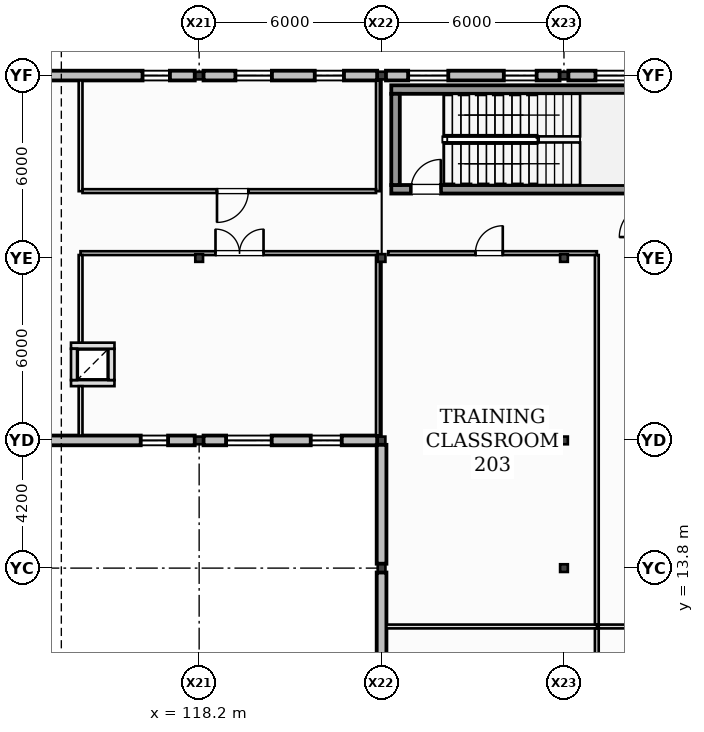
"""IFC4 building model, lengths in metres.
Left out: names, types, materials, properties, quantities, classifications, styles, units other than length and angle.
Written with IfcOpenShell. Run it as: python <this file> out.ifc"""

import sys

from ifc_helpers import new_model, si_unit, direction, frame, frame_2d, origin, origin_2d, place, context, subcontext, project, spatial, rectangle, hollow_rectangle, i_section, extrude, element, fill, save


model = new_model("IFC4")
c1 = context("Model", 3, precision=1e-05, world=origin(), true_north=direction((0.0, 1.0)))
c2 = subcontext(c1, "Body", "Model", "MODEL_VIEW")
j1 = project(units=[si_unit("LENGTHUNIT", "METRE"), si_unit("PLANEANGLEUNIT", "RADIAN")], contexts=[c1])
p1 = place(None, origin())
s1 = spatial("IfcSite", under=j1, at=p1, CompositionType="ELEMENT")
p2 = place(p1, origin())
s2 = spatial("IfcBuilding", under=s1, at=p2, CompositionType="ELEMENT")
p3 = place(p2, frame((0.0, 0.0, 6.0)))
s3 = spatial("IfcBuildingStorey", under=s2, at=p3, CompositionType="ELEMENT", Elevation=6.0)
for number, where, z_axis, x_axis in (
    (1, (118.2, 18.0, 0.0), (0.0, 0.0, 1.0), (1.0, 0.0, 0.0)),
    (2, (118.2, 24.0, 0.0), (0.0, 0.0, 1.0), (1.0, 0.0, 0.0)),
):
    element("IfcColumn", number, at=place(p3, frame(where, z_axis=z_axis, x_axis=x_axis)), inside=s3, PredefinedType="COLUMN", context=c2, shape_type="SweptSolid", body=[
        extrude(i_section(OverallWidth=0.254, OverallDepth=0.253, WebThickness=0.009, FlangeThickness=0.014, at=origin_2d()), origin(), (0.0, 0.0, 1.0), 4.0),
    ])
p4 = place(p3, frame((118.2, 30.0, 0.0), z_axis=(0.0, 0.0, 1.0), x_axis=(1.0, 0.0, 0.0)))
e3 = element("IfcColumn", 3, at=p4, inside=s3, PredefinedType="COLUMN", context=c2, shape_type="SweptSolid", body=[
    extrude(hollow_rectangle(XDim=0.25, YDim=0.25, WallThickness=0.012, at=origin_2d()), origin(), (0.0, 0.0, 1.0), 4.0),
])
p5 = place(p3, frame((124.2, 13.8, 0.0), z_axis=(0.0, 0.0, 1.0), x_axis=(1.0, 0.0, 0.0)))
e4 = element("IfcColumn", 4, at=p5, inside=s3, PredefinedType="COLUMN", context=c2, shape_type="SweptSolid", body=[
    extrude(i_section(OverallWidth=0.254, OverallDepth=0.253, WebThickness=0.009, FlangeThickness=0.014, at=origin_2d()), origin(), (0.0, 0.0, 1.0), 4.0),
])
p6 = place(p3, frame((124.2, 18.0, 0.0), z_axis=(0.0, 0.0, 1.0), x_axis=(1.0, 0.0, 0.0)))
e5 = element("IfcColumn", 5, at=p6, inside=s3, PredefinedType="COLUMN", context=c2, shape_type="SweptSolid", body=[
    extrude(hollow_rectangle(XDim=0.25, YDim=0.25, WallThickness=0.012, at=origin_2d()), origin(), (0.0, 0.0, 1.0), 4.0),
])
for number, where, z_axis, x_axis in (
    (6, (124.2, 24.0, 0.0), (0.0, 0.0, 1.0), (1.0, 0.0, 0.0)),
    (7, (124.2, 30.0, 0.0), (0.0, 0.0, 1.0), (1.0, 0.0, 0.0)),
    (8, (130.2, 13.8, 0.0), (0.0, 0.0, 1.0), (1.0, 0.0, 0.0)),
    (9, (130.2, 18.0, 0.0), (0.0, 0.0, 1.0), (1.0, 0.0, 0.0)),
    (10, (130.2, 24.0, 0.0), (0.0, 0.0, 1.0), (1.0, 0.0, 0.0)),
):
    element("IfcColumn", number, at=place(p3, frame(where, z_axis=z_axis, x_axis=x_axis)), inside=s3, PredefinedType="COLUMN", context=c2, shape_type="SweptSolid", body=[
        extrude(i_section(OverallWidth=0.254, OverallDepth=0.253, WebThickness=0.009, FlangeThickness=0.014, at=origin_2d()), origin(), (0.0, 0.0, 1.0), 4.0),
    ])
p7 = place(p3, frame((130.2, 30.0, 0.0), z_axis=(0.0, 0.0, 1.0), x_axis=(1.0, 0.0, 0.0)))
e11 = element("IfcColumn", 11, at=p7, inside=s3, PredefinedType="COLUMN", context=c2, shape_type="SweptSolid", body=[
    extrude(hollow_rectangle(XDim=0.25, YDim=0.25, WallThickness=0.012, at=origin_2d()), origin(), (0.0, 0.0, 1.0), 4.0),
])
p8 = place(p3, frame((112.345, 18.0, 0.0), z_axis=(0.0, 0.0, 1.0), x_axis=(1.0, 0.0, 0.0)))
e12 = element("IfcWall", 12, at=p8, inside=s3, PredefinedType="STANDARD", context=c2, shape_type="SweptSolid", body=[
    extrude(rectangle(XDim=5.71, YDim=0.32, at=frame_2d((2.855, 0.0))), origin(), (0.0, 0.0, 1.0), 3.619),
])
p9 = place(p8, frame((3.933, 0.0, 0.86)))
e13 = element("IfcOpeningElement", 13, at=p9, cuts=e12, PredefinedType="OPENING", context=c2, shape_type="SweptSolid", body=[
    extrude(rectangle(XDim=0.9, YDim=0.9, at=frame_2d((0.45, 0.45))), frame((0.0, 0.17, 0.0), z_axis=(0.0, -1.0, 0.0), x_axis=(1.0, 0.0, 0.0)), (0.0, 0.0, 1.0), 0.34),
])
p10 = place(p3, frame((118.345, 18.0, 0.0), z_axis=(0.0, 0.0, 1.0), x_axis=(1.0, 0.0, 0.0)))
e14 = element("IfcWall", 14, at=p10, inside=s3, PredefinedType="STANDARD", context=c2, shape_type="SweptSolid", body=[
    extrude(rectangle(XDim=5.71, YDim=0.32, at=frame_2d((2.855, 0.0))), origin(), (0.0, 0.0, 1.0), 3.619),
])
p11 = place(p10, frame((0.741, 0.0, 1.28)))
e15 = element("IfcOpeningElement", 15, at=p11, cuts=e14, PredefinedType="OPENING", context=c2, shape_type="SweptSolid", body=[
    extrude(rectangle(XDim=1.5, YDim=1.5, at=frame_2d((0.75, 0.75))), frame((0.0, 0.17, 0.0), z_axis=(0.0, -1.0, 0.0), x_axis=(1.0, 0.0, 0.0)), (0.0, 0.0, 1.0), 0.34),
])
p12 = place(p10, frame((3.525, 0.0, 1.18)))
e16 = element("IfcOpeningElement", 16, at=p12, cuts=e14, PredefinedType="OPENING", context=c2, shape_type="SweptSolid", body=[
    extrude(rectangle(XDim=1.02, YDim=1.02, at=frame_2d((0.51, 0.51))), frame((0.0, 0.17, 0.0), z_axis=(0.0, -1.0, 0.0), x_axis=(1.0, 0.0, 0.0)), (0.0, 0.0, 1.0), 0.34),
])
p13 = place(p3, frame((118.055, 30.0, 0.0), z_axis=(0.0, 0.0, 1.0), x_axis=(-1.0, 0.0, 0.0)))
e17 = element("IfcWall", 17, at=p13, inside=s3, PredefinedType="STANDARD", context=c2, shape_type="SweptSolid", body=[
    extrude(rectangle(XDim=5.71, YDim=0.32, at=frame_2d((2.855, 0.0))), origin(), (0.0, 0.0, 1.0), 3.619),
])
p14 = place(p13, frame((0.817, 0.0, 0.86)))
e18 = element("IfcOpeningElement", 18, at=p14, cuts=e17, PredefinedType="OPENING", context=c2, shape_type="SweptSolid", body=[
    extrude(rectangle(XDim=0.9, YDim=0.9, at=frame_2d((0.45, 0.45))), frame((0.0, 0.17, 0.0), z_axis=(0.0, -1.0, 0.0), x_axis=(1.0, 0.0, 0.0)), (0.0, 0.0, 1.0), 0.34),
])
p15 = place(p3, frame((124.055, 30.0, 0.0), z_axis=(0.0, 0.0, 1.0), x_axis=(-1.0, 0.0, 0.0)))
e19 = element("IfcWall", 19, at=p15, inside=s3, PredefinedType="STANDARD", context=c2, shape_type="SweptSolid", body=[
    extrude(rectangle(XDim=5.71, YDim=0.32, at=frame_2d((2.855, 0.0))), origin(), (0.0, 0.0, 1.0), 3.619),
])
p16 = place(p15, frame((1.092, 0.0, 1.18)))
e20 = element("IfcOpeningElement", 20, at=p16, cuts=e19, PredefinedType="OPENING", context=c2, shape_type="SweptSolid", body=[
    extrude(rectangle(XDim=0.96, YDim=0.96, at=frame_2d((0.48, 0.48))), frame((0.0, 0.17, 0.0), z_axis=(0.0, -1.0, 0.0), x_axis=(1.0, 0.0, 0.0)), (0.0, 0.0, 1.0), 0.34),
])
p17 = place(p15, frame((3.462, 0.0, 0.96)))
e21 = element("IfcOpeningElement", 21, at=p17, cuts=e19, PredefinedType="OPENING", context=c2, shape_type="SweptSolid", body=[
    extrude(rectangle(XDim=1.2, YDim=1.2, at=frame_2d((0.6, 0.6))), frame((0.0, 0.17, 0.0), z_axis=(0.0, -1.0, 0.0), x_axis=(1.0, 0.0, 0.0)), (0.0, 0.0, 1.0), 0.34),
])
p18 = place(p3, frame((130.055, 30.0, 0.0), z_axis=(0.0, 0.0, 1.0), x_axis=(-1.0, 0.0, 0.0)))
e22 = element("IfcWall", 22, at=p18, inside=s3, PredefinedType="STANDARD", context=c2, shape_type="SweptSolid", body=[
    extrude(rectangle(XDim=5.71, YDim=0.32, at=frame_2d((2.855, 0.0))), origin(), (0.0, 0.0, 1.0), 3.153),
])
p19 = place(p18, frame((0.754, 0.0, 1.42)))
e23 = element("IfcOpeningElement", 23, at=p19, cuts=e22, PredefinedType="OPENING", context=c2, shape_type="SweptSolid", body=[
    extrude(rectangle(XDim=1.08, YDim=1.08, at=frame_2d((0.54, 0.54))), frame((0.0, 0.17, 0.0), z_axis=(0.0, -1.0, 0.0), x_axis=(1.0, 0.0, 0.0)), (0.0, 0.0, 1.0), 0.34),
])
p20 = place(p18, frame((3.66, 0.0, 1.28)))
e24 = element("IfcOpeningElement", 24, at=p20, cuts=e22, PredefinedType="OPENING", context=c2, shape_type="SweptSolid", body=[
    extrude(rectangle(XDim=1.32, YDim=1.32, at=frame_2d((0.66, 0.66))), frame((0.0, 0.17, 0.0), z_axis=(0.0, -1.0, 0.0), x_axis=(1.0, 0.0, 0.0)), (0.0, 0.0, 1.0), 0.34),
])
p21 = place(p3, frame((136.055, 30.0, 0.0), z_axis=(0.0, 0.0, 1.0), x_axis=(-1.0, 0.0, 0.0)))
e25 = element("IfcWall", 25, at=p21, inside=s3, PredefinedType="STANDARD", context=c2, shape_type="SweptSolid", body=[
    extrude(rectangle(XDim=5.71, YDim=0.32, at=frame_2d((2.855, 0.0))), origin(), (0.0, 0.0, 1.0), 3.153),
])
p22 = place(p21, frame((0.936, 0.0, 0.96)))
e26 = element("IfcOpeningElement", 26, at=p22, cuts=e25, PredefinedType="OPENING", context=c2, shape_type="SweptSolid", body=[
    extrude(rectangle(XDim=1.2, YDim=1.2, at=frame_2d((0.6, 0.6))), frame((0.0, 0.17, 0.0), z_axis=(0.0, -1.0, 0.0), x_axis=(1.0, 0.0, 0.0)), (0.0, 0.0, 1.0), 0.34),
])
p23 = place(p21, frame((3.378, 0.0, 0.86)))
e27 = element("IfcOpeningElement", 27, at=p23, cuts=e25, PredefinedType="OPENING", context=c2, shape_type="SweptSolid", body=[
    extrude(rectangle(XDim=1.44, YDim=1.44, at=frame_2d((0.72, 0.72))), frame((0.0, 0.17, 0.0), z_axis=(0.0, -1.0, 0.0), x_axis=(1.0, 0.0, 0.0)), (0.0, 0.0, 1.0), 0.34),
])
p24 = place(p3, frame((124.2, 13.655, 0.0), z_axis=(0.0, 0.0, 1.0), x_axis=(0.0, -1.0, 0.0)))
e28 = element("IfcWall", 28, at=p24, inside=s3, PredefinedType="STANDARD", context=c2, shape_type="SweptSolid", body=[
    extrude(rectangle(XDim=5.71, YDim=0.32, at=frame_2d((2.855, 0.0))), origin(), (0.0, 0.0, 1.0), 3.227),
])
p25 = place(p24, frame((3.933, 0.0, 1.28)))
e29 = element("IfcOpeningElement", 29, at=p25, cuts=e28, PredefinedType="OPENING", context=c2, shape_type="SweptSolid", body=[
    extrude(rectangle(XDim=0.9, YDim=0.9, at=frame_2d((0.45, 0.45))), frame((0.0, 0.17, 0.0), z_axis=(0.0, -1.0, 0.0), x_axis=(1.0, 0.0, 0.0)), (0.0, 0.0, 1.0), 0.34),
])
p26 = place(p3, frame((124.2, 17.855, 0.0), z_axis=(0.0, 0.0, 1.0), x_axis=(0.0, -1.0, 0.0)))
e30 = element("IfcWall", 30, at=p26, inside=s3, PredefinedType="STANDARD", context=c2, shape_type="SweptSolid", body=[
    extrude(rectangle(XDim=3.91, YDim=0.32, at=frame_2d((1.955, 0.0))), origin(), (0.0, 0.0, 1.0), 3.227),
])
p27 = place(p3, frame((124.52, 26.26, 0.0), z_axis=(0.0, 0.0, 1.0), x_axis=(1.0, 0.0, 0.0)))
e31 = element("IfcWall", 31, at=p27, inside=s3, PredefinedType="SHEAR", context=c2, shape_type="SweptSolid", body=[
    extrude(rectangle(XDim=8.16, YDim=0.28, at=frame_2d((4.08, 0.0))), origin(), (0.0, 0.0, 1.0), 4.0),
])
p28 = place(p27, frame((0.65, 0.0, 0.0)))
e32 = element("IfcOpeningElement", 32, at=p28, cuts=e31, PredefinedType="OPENING", context=c2, shape_type="SweptSolid", body=[
    extrude(rectangle(XDim=0.98, YDim=2.15, at=frame_2d((0.49, 1.075))), frame((0.0, 0.15, 0.0), z_axis=(0.0, -1.0, 0.0), x_axis=(1.0, 0.0, 0.0)), (0.0, 0.0, 1.0), 0.3),
])
p29 = place(p3, frame((132.68, 29.54, 0.0), z_axis=(0.0, 0.0, 1.0), x_axis=(-1.0, 0.0, 0.0)))
e33 = element("IfcWall", 33, at=p29, inside=s3, PredefinedType="SHEAR", context=c2, shape_type="SweptSolid", body=[
    extrude(rectangle(XDim=8.16, YDim=0.28, at=frame_2d((4.08, 0.0))), origin(), (0.0, 0.0, 1.0), 4.0),
])
p30 = place(p3, frame((124.66, 29.4, 0.0), z_axis=(0.0, 0.0, 1.0), x_axis=(0.0, -1.0, 0.0)))
e34 = element("IfcWall", 34, at=p30, inside=s3, PredefinedType="SHEAR", context=c2, shape_type="SweptSolid", body=[
    extrude(rectangle(XDim=3.0, YDim=0.28, at=frame_2d((1.5, 0.0))), origin(), (0.0, 0.0, 1.0), 4.0),
])
p31 = place(p3, frame((113.985, 19.885, 0.0), z_axis=(0.0, 0.0, 1.0), x_axis=(1.0, 0.0, 0.0)))
e35 = element("IfcWall", 35, at=p31, inside=s3, PredefinedType="PARTITIONING", context=c2, shape_type="SweptSolid", body=[
    extrude(rectangle(XDim=1.43, YDim=0.2, at=frame_2d((0.715, 0.0))), origin(), (0.0, 0.0, 1.0), 3.72),
])
p32 = place(p3, frame((115.315, 19.985, 0.0), z_axis=(0.0, 0.0, 1.0), x_axis=(0.0, 1.0, 0.0)))
e36 = element("IfcWall", 36, at=p32, inside=s3, PredefinedType="PARTITIONING", context=c2, shape_type="SweptSolid", body=[
    extrude(rectangle(XDim=1.03, YDim=0.2, at=frame_2d((0.515, 0.0))), origin(), (0.0, 0.0, 1.0), 3.72),
])
p33 = place(p3, frame((115.415, 21.115, 0.0), z_axis=(0.0, 0.0, 1.0), x_axis=(-1.0, 0.0, 0.0)))
e37 = element("IfcWall", 37, at=p33, inside=s3, PredefinedType="PARTITIONING", context=c2, shape_type="SweptSolid", body=[
    extrude(rectangle(XDim=1.43, YDim=0.2, at=frame_2d((0.715, 0.0))), origin(), (0.0, 0.0, 1.0), 3.72),
])
p34 = place(p3, frame((114.085, 21.015, 0.0), z_axis=(0.0, 0.0, 1.0), x_axis=(0.0, -1.0, 0.0)))
e38 = element("IfcWall", 38, at=p34, inside=s3, PredefinedType="PARTITIONING", context=c2, shape_type="SweptSolid", body=[
    extrude(rectangle(XDim=1.03, YDim=0.2, at=frame_2d((0.515, 0.0))), origin(), (0.0, 0.0, 1.0), 3.72),
])
p35 = place(p3, frame((114.298, 24.16, 0.0), z_axis=(0.0, 0.0, 1.0), x_axis=(1.0, 0.0, 0.0)))
e39 = element("IfcWall", 39, at=p35, inside=s3, PredefinedType="PARTITIONING", context=c2, shape_type="SweptSolid", body=[
    extrude(rectangle(XDim=9.785, YDim=0.125, at=frame_2d((4.893, 0.0))), origin(), (0.0, 0.0, 1.0), 3.72),
])
p36 = place(p35, frame((4.44, 0.0, 0.0)))
e40 = element("IfcOpeningElement", 40, at=p36, cuts=e39, PredefinedType="OPENING", context=c2, shape_type="SweptSolid", body=[
    extrude(rectangle(XDim=1.58, YDim=2.2, at=frame_2d((0.79, 1.1))), frame((0.0, 0.073, 0.0), z_axis=(0.0, -1.0, 0.0), x_axis=(1.0, 0.0, 0.0)), (0.0, 0.0, 1.0), 0.145),
])
p37 = place(p3, frame((124.08, 24.097, 0.0), z_axis=(0.0, 0.0, 1.0), x_axis=(0.0, -1.0, 0.0)))
e41 = element("IfcWall", 41, at=p37, inside=s3, PredefinedType="PARTITIONING", context=c2, shape_type="SweptSolid", body=[
    extrude(rectangle(XDim=5.938, YDim=0.125, at=frame_2d((2.969, 0.0))), origin(), (0.0, 0.0, 1.0), 3.72),
])
p38 = place(p3, frame((114.3, 18.16, 0.0), z_axis=(0.0, 0.0, 1.0), x_axis=(0.0, 1.0, 0.0)))
e42 = element("IfcWall", 42, at=p38, inside=s3, PredefinedType="PARTITIONING", context=c2, shape_type="SweptSolid", body=[
    extrude(rectangle(XDim=1.625, YDim=0.125, at=frame_2d((0.812, 0.0))), origin(), (0.0, 0.0, 1.0), 3.72),
])
p39 = place(p3, frame((114.3, 21.215, 0.0), z_axis=(0.0, 0.0, 1.0), x_axis=(0.0, 1.0, 0.0)))
e43 = element("IfcWall", 43, at=p39, inside=s3, PredefinedType="PARTITIONING", context=c2, shape_type="SweptSolid", body=[
    extrude(rectangle(XDim=2.882, YDim=0.125, at=frame_2d((1.441, 0.0))), origin(), (0.0, 0.0, 1.0), 3.72),
])
for number, where, z_axis, x_axis in (
    (44, (114.3, 26.198, 0.0), (0.0, 0.0, 1.0), (0.0, 1.0, 0.0)),
    (45, (124.08, 29.84, 0.0), (0.0, 0.0, 1.0), (0.0, -1.0, 0.0)),
):
    element("IfcWall", number, at=place(p3, frame(where, z_axis=z_axis, x_axis=x_axis)), inside=s3, PredefinedType="PARTITIONING", context=c2, shape_type="SweptSolid", body=[
        extrude(rectangle(XDim=3.643, YDim=0.125, at=frame_2d((1.821, 0.0))), origin(), (0.0, 0.0, 1.0), 3.72),
    ])
p40 = place(p3, frame((124.018, 26.2, 0.0), z_axis=(0.0, 0.0, 1.0), x_axis=(-1.0, 0.0, 0.0)))
e46 = element("IfcWall", 46, at=p40, inside=s3, PredefinedType="PARTITIONING", context=c2, shape_type="SweptSolid", body=[
    extrude(rectangle(XDim=9.655, YDim=0.125, at=frame_2d((4.828, 0.0))), origin(), (0.0, 0.0, 1.0), 3.72),
])
p41 = place(p40, frame((4.2, 0.0, 0.0)))
e47 = element("IfcOpeningElement", 47, at=p41, cuts=e46, PredefinedType="OPENING", context=c2, shape_type="SweptSolid", body=[
    extrude(rectangle(XDim=1.03, YDim=2.15, at=frame_2d((0.515, 1.075))), frame((0.0, 0.073, 0.0), z_axis=(0.0, -1.0, 0.0), x_axis=(1.0, 0.0, 0.0)), (0.0, 0.0, 1.0), 0.145),
])
p42 = place(p3, frame((124.36, 11.88, 0.0), z_axis=(0.0, 0.0, 1.0), x_axis=(1.0, 0.0, 0.0)))
e48 = element("IfcWall", 48, at=p42, inside=s3, PredefinedType="PARTITIONING", context=c2, shape_type="SweptSolid", body=[
    extrude(rectangle(XDim=6.922, YDim=0.125, at=frame_2d((3.461, 0.0))), origin(), (0.0, 0.0, 1.0), 3.72),
])
p43 = place(p3, frame((131.28, 11.817, 0.0), z_axis=(0.0, 0.0, 1.0), x_axis=(0.0, -1.0, 0.0)))
e49 = element("IfcWall", 49, at=p43, inside=s3, PredefinedType="PARTITIONING", context=c2, shape_type="SweptSolid", body=[
    extrude(rectangle(XDim=9.857, YDim=0.125, at=frame_2d((4.929, 0.0))), origin(), (0.0, 0.0, 1.0), 3.72),
])
p44 = place(p43, frame((4.574, 0.0, 0.0)))
e50 = element("IfcOpeningElement", 50, at=p44, cuts=e49, PredefinedType="OPENING", context=c2, shape_type="SweptSolid", body=[
    extrude(rectangle(XDim=0.93, YDim=2.1, at=frame_2d((0.465, 1.05))), frame((0.0, 0.073, 0.0), z_axis=(0.0, -1.0, 0.0), x_axis=(1.0, 0.0, 0.0)), (0.0, 0.0, 1.0), 0.145),
])
p45 = place(p3, frame((131.343, 11.88, 0.0), z_axis=(0.0, 0.0, 1.0), x_axis=(1.0, 0.0, 0.0)))
e51 = element("IfcWall", 51, at=p45, inside=s3, PredefinedType="PARTITIONING", context=c2, shape_type="SweptSolid", body=[
    extrude(rectangle(XDim=6.82, YDim=0.125, at=frame_2d((3.41, 0.0))), origin(), (0.0, 0.0, 1.0), 3.72),
])
p46 = place(p3, frame((124.417, 24.16, 0.0), z_axis=(0.0, 0.0, 1.0), x_axis=(1.0, 0.0, 0.0)))
e52 = element("IfcWall", 52, at=p46, inside=s3, PredefinedType="PARTITIONING", context=c2, shape_type="SweptSolid", body=[
    extrude(rectangle(XDim=6.865, YDim=0.125, at=frame_2d((3.433, 0.0))), origin(), (0.0, 0.0, 1.0), 3.153),
])
p47 = place(p46, frame((2.87, 0.0, 0.0)))
e53 = element("IfcOpeningElement", 53, at=p47, cuts=e52, PredefinedType="OPENING", context=c2, shape_type="SweptSolid", body=[
    extrude(rectangle(XDim=0.9, YDim=2.1, at=frame_2d((0.45, 1.05))), frame((0.0, 0.073, 0.0), z_axis=(0.0, -1.0, 0.0), x_axis=(1.0, 0.0, 0.0)), (0.0, 0.0, 1.0), 0.145),
])
p48 = place(p3, frame((131.28, 24.097, 0.0), z_axis=(0.0, 0.0, 1.0), x_axis=(0.0, -1.0, 0.0)))
e54 = element("IfcWall", 54, at=p48, inside=s3, PredefinedType="PARTITIONING", context=c2, shape_type="SweptSolid", body=[
    extrude(rectangle(XDim=12.155, YDim=0.125, at=frame_2d((6.078, 0.0))), origin(), (0.0, 0.0, 1.0), 3.72),
])
p49 = place(p9, origin())
e55 = element("IfcWindow", 55, at=p49, inside=s3, PartitioningType="SINGLE_PANEL", PredefinedType="WINDOW", context=c2, shape_type="SweptSolid", body=[
    extrude(rectangle(XDim=0.9, YDim=0.9, at=frame_2d((0.45, 0.45))), frame((0.0, 0.03, 0.0), z_axis=(0.0, -1.0, 0.0), x_axis=(1.0, 0.0, 0.0)), (0.0, 0.0, 1.0), 0.06),
])
fill(e13, e55)
p50 = place(p11, origin())
e56 = element("IfcWindow", 56, at=p50, inside=s3, PartitioningType="SINGLE_PANEL", PredefinedType="WINDOW", context=c2, shape_type="SweptSolid", body=[
    extrude(rectangle(XDim=1.5, YDim=1.5, at=frame_2d((0.75, 0.75))), frame((0.0, 0.03, 0.0), z_axis=(0.0, -1.0, 0.0), x_axis=(1.0, 0.0, 0.0)), (0.0, 0.0, 1.0), 0.06),
])
fill(e15, e56)
p51 = place(p12, origin())
e57 = element("IfcWindow", 57, at=p51, inside=s3, PartitioningType="SINGLE_PANEL", PredefinedType="WINDOW", context=c2, shape_type="SweptSolid", body=[
    extrude(rectangle(XDim=1.02, YDim=1.02, at=frame_2d((0.51, 0.51))), frame((0.0, 0.03, 0.0), z_axis=(0.0, -1.0, 0.0), x_axis=(1.0, 0.0, 0.0)), (0.0, 0.0, 1.0), 0.06),
])
fill(e16, e57)
p52 = place(p14, origin())
e58 = element("IfcWindow", 58, at=p52, inside=s3, PartitioningType="SINGLE_PANEL", PredefinedType="WINDOW", context=c2, shape_type="SweptSolid", body=[
    extrude(rectangle(XDim=0.9, YDim=0.9, at=frame_2d((0.45, 0.45))), frame((0.0, 0.03, 0.0), z_axis=(0.0, -1.0, 0.0), x_axis=(1.0, 0.0, 0.0)), (0.0, 0.0, 1.0), 0.06),
])
fill(e18, e58)
p53 = place(p16, origin())
e59 = element("IfcWindow", 59, at=p53, inside=s3, PartitioningType="SINGLE_PANEL", PredefinedType="WINDOW", context=c2, shape_type="SweptSolid", body=[
    extrude(rectangle(XDim=0.96, YDim=0.96, at=frame_2d((0.48, 0.48))), frame((0.0, 0.03, 0.0), z_axis=(0.0, -1.0, 0.0), x_axis=(1.0, 0.0, 0.0)), (0.0, 0.0, 1.0), 0.06),
])
fill(e20, e59)
p54 = place(p17, origin())
e60 = element("IfcWindow", 60, at=p54, inside=s3, PartitioningType="SINGLE_PANEL", PredefinedType="WINDOW", context=c2, shape_type="SweptSolid", body=[
    extrude(rectangle(XDim=1.2, YDim=1.2, at=frame_2d((0.6, 0.6))), frame((0.0, 0.03, 0.0), z_axis=(0.0, -1.0, 0.0), x_axis=(1.0, 0.0, 0.0)), (0.0, 0.0, 1.0), 0.06),
])
fill(e21, e60)
p55 = place(p19, origin())
e61 = element("IfcWindow", 61, at=p55, inside=s3, PartitioningType="SINGLE_PANEL", PredefinedType="WINDOW", context=c2, shape_type="SweptSolid", body=[
    extrude(rectangle(XDim=1.08, YDim=1.08, at=frame_2d((0.54, 0.54))), frame((0.0, 0.03, 0.0), z_axis=(0.0, -1.0, 0.0), x_axis=(1.0, 0.0, 0.0)), (0.0, 0.0, 1.0), 0.06),
])
fill(e23, e61)
p56 = place(p20, origin())
e62 = element("IfcWindow", 62, at=p56, inside=s3, PartitioningType="SINGLE_PANEL", PredefinedType="WINDOW", context=c2, shape_type="SweptSolid", body=[
    extrude(rectangle(XDim=1.32, YDim=1.32, at=frame_2d((0.66, 0.66))), frame((0.0, 0.03, 0.0), z_axis=(0.0, -1.0, 0.0), x_axis=(1.0, 0.0, 0.0)), (0.0, 0.0, 1.0), 0.06),
])
fill(e24, e62)
p57 = place(p23, origin())
e63 = element("IfcWindow", 63, at=p57, inside=s3, PartitioningType="SINGLE_PANEL", PredefinedType="WINDOW", context=c2, shape_type="SweptSolid", body=[
    extrude(rectangle(XDim=1.44, YDim=1.44, at=frame_2d((0.72, 0.72))), frame((0.0, 0.03, 0.0), z_axis=(0.0, -1.0, 0.0), x_axis=(1.0, 0.0, 0.0)), (0.0, 0.0, 1.0), 0.06),
])
fill(e27, e63)
p58 = place(p28, origin())
e64 = element("IfcDoor", 64, at=p58, inside=s3, OperationType="SINGLE_SWING_RIGHT", PredefinedType="DOOR", context=c2, shape_type="SweptSolid", body=[
    extrude(rectangle(XDim=0.98, YDim=2.15, at=frame_2d((0.49, 1.075))), frame((0.0, 0.025, 0.0), z_axis=(0.0, -1.0, 0.0), x_axis=(1.0, 0.0, 0.0)), (0.0, 0.0, 1.0), 0.05),
])
fill(e32, e64)
p59 = place(p36, origin())
e65 = element("IfcDoor", 65, at=p59, inside=s3, OperationType="DOUBLE_DOOR_SINGLE_SWING", PredefinedType="DOOR", context=c2, shape_type="SweptSolid", body=[
    extrude(rectangle(XDim=1.58, YDim=2.2, at=frame_2d((0.79, 1.1))), frame((0.0, 0.025, 0.0), z_axis=(0.0, -1.0, 0.0), x_axis=(1.0, 0.0, 0.0)), (0.0, 0.0, 1.0), 0.05),
])
fill(e40, e65)
p60 = place(p41, frame((1.03, 0.0, 0.0), z_axis=(0.0, 0.0, 1.0), x_axis=(-1.0, 0.0, 0.0)))
e66 = element("IfcDoor", 66, at=p60, inside=s3, OperationType="SINGLE_SWING_RIGHT", PredefinedType="DOOR", context=c2, shape_type="SweptSolid", body=[
    extrude(rectangle(XDim=1.03, YDim=2.15, at=frame_2d((0.515, 1.075))), frame((0.0, 0.025, 0.0), z_axis=(0.0, -1.0, 0.0), x_axis=(1.0, 0.0, 0.0)), (0.0, 0.0, 1.0), 0.05),
])
fill(e47, e66)
p61 = place(p47, frame((0.9, 0.0, 0.0), z_axis=(0.0, 0.0, 1.0), x_axis=(-1.0, 0.0, 0.0)))
e67 = element("IfcDoor", 67, at=p61, inside=s3, OperationType="SINGLE_SWING_RIGHT", PredefinedType="DOOR", context=c2, shape_type="SweptSolid", body=[
    extrude(rectangle(XDim=0.9, YDim=2.1, at=frame_2d((0.45, 1.05))), frame((0.0, 0.025, 0.0), z_axis=(0.0, -1.0, 0.0), x_axis=(1.0, 0.0, 0.0)), (0.0, 0.0, 1.0), 0.05),
])
fill(e53, e67)
save(model, sys.argv[1])
